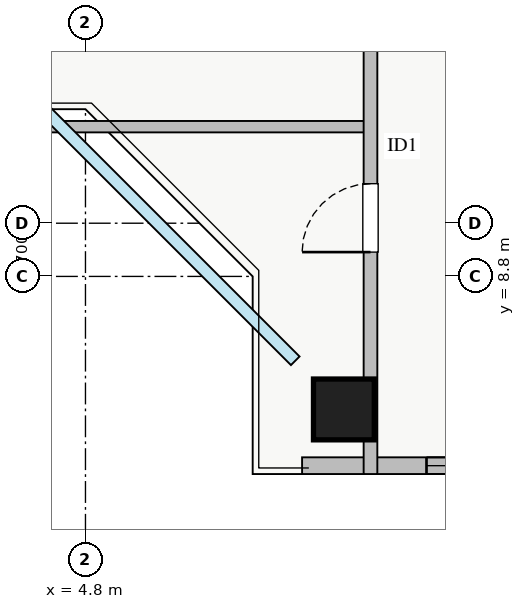
"""IFC4 building model, lengths in metres.
Left out: names, types, materials, properties, quantities, classifications, styles, units other than length and angle.
Written with IfcOpenShell. Run it as: python <this file> out.ifc"""

import sys

from ifc_helpers import new_model, si_unit, direction, frame, frame_2d, origin, origin_2d, place, context, subcontext, project, spatial, rectangle, extrude, source, transform, mapped, element, fill, save


model = new_model("IFC4")
c1 = context("Model", 3, precision=1e-05, world=origin(), true_north=direction((0.0, 1.0)))
c2 = subcontext(c1, "Body", "Model", "MODEL_VIEW")
j1 = project(units=[si_unit("LENGTHUNIT", "METRE"), si_unit("PLANEANGLEUNIT", "RADIAN")], contexts=[c1])
p1 = place(None, origin())
s1 = spatial("IfcSite", under=j1, at=p1, CompositionType="ELEMENT")
p2 = place(p1, origin())
s2 = spatial("IfcBuilding", under=s1, at=p2, CompositionType="ELEMENT")
p3 = place(p2, frame((0.0, 0.0, 203.5)))
s3 = spatial("IfcBuildingStorey", under=s2, at=p3, CompositionType="ELEMENT", Elevation=203.5)
m1 = source(origin(), c2, "Body", "SweptSolid", [
    extrude(rectangle(XDim=0.8, YDim=0.8, at=origin_2d()), origin(), (0.0, 0.0, 1.0), 3.25),
])
p4 = place(p3, frame((8.2, 7.05, 0.0), z_axis=(0.0, 0.0, 1.0), x_axis=(1.0, 0.0, 0.0)))
e1 = element("IfcColumn", 1, at=p4, inside=s3, PredefinedType="COLUMN", context=c2, shape_type="MappedRepresentation", body=[
    mapped(m1, transform((0.0, 0.0, 0.0), x_axis=(1.0, 0.0, 0.0), y_axis=(0.0, 1.0, 0.0), z_axis=(0.0, 0.0, 1.0), scale=1.0)),
])
p5 = place(p3, frame((7.65, 6.31, 0.0), z_axis=(0.0, 0.0, 1.0), x_axis=(1.0, 0.0, 0.0)))
e2 = element("IfcWall", 2, at=p5, inside=s3, PredefinedType="STANDARD", context=c2, shape_type="SweptSolid", body=[
    extrude(rectangle(XDim=22.7, YDim=0.22, at=frame_2d((11.35, 0.0))), origin(), (0.0, 0.0, 1.0), 2.61),
])
p6 = place(p5, frame((12.2, 0.0, 0.0)))
e3 = element("IfcOpeningElement", 3, at=p6, cuts=e2, PredefinedType="OPENING", context=c2, shape_type="SweptSolid", body=[
    extrude(rectangle(XDim=1.2, YDim=2.1, at=frame_2d((0.6, 1.05))), frame((0.0, 0.12, 0.0), z_axis=(0.0, -1.0, 0.0), x_axis=(1.0, 0.0, 0.0)), (0.0, 0.0, 1.0), 0.24),
])
p7 = place(p5, frame((1.637, 0.0, 0.9)))
e4 = element("IfcOpeningElement", 4, at=p7, cuts=e2, PredefinedType="OPENING", context=c2, shape_type="SweptSolid", body=[
    extrude(rectangle(XDim=2.4, YDim=1.48, at=frame_2d((1.2, 0.74))), frame((0.0, 0.12, 0.0), z_axis=(0.0, -1.0, 0.0), x_axis=(1.0, 0.0, 0.0)), (0.0, 0.0, 1.0), 0.24),
])
p8 = place(p5, frame((7.612, 0.0, 0.9)))
e5 = element("IfcOpeningElement", 5, at=p8, cuts=e2, PredefinedType="OPENING", context=c2, shape_type="SweptSolid", body=[
    extrude(rectangle(XDim=1.8, YDim=1.45, at=frame_2d((0.9, 0.725))), frame((0.0, 0.12, 0.0), z_axis=(0.0, -1.0, 0.0), x_axis=(1.0, 0.0, 0.0)), (0.0, 0.0, 1.0), 0.24),
])
p9 = place(p5, frame((20.137, 0.0, 0.9)))
e6 = element("IfcOpeningElement", 6, at=p9, cuts=e2, PredefinedType="OPENING", context=c2, shape_type="SweptSolid", body=[
    extrude(rectangle(XDim=2.1, YDim=1.5, at=frame_2d((1.05, 0.75))), frame((0.0, 0.12, 0.0), z_axis=(0.0, -1.0, 0.0), x_axis=(1.0, 0.0, 0.0)), (0.0, 0.0, 1.0), 0.24),
])
p10 = place(p5, frame((16.72, 0.0, 0.9)))
e7 = element("IfcOpeningElement", 7, at=p10, cuts=e2, PredefinedType="OPENING", context=c2, shape_type="SweptSolid", body=[
    extrude(rectangle(XDim=2.4, YDim=1.5, at=frame_2d((1.2, 0.75))), frame((0.0, 0.12, 0.0), z_axis=(0.0, -1.0, 0.0), x_axis=(1.0, 0.0, 0.0)), (0.0, 0.0, 1.0), 0.24),
])
p11 = place(p3, frame((2.45, 10.77, 0.0), z_axis=(0.0, 0.0, 1.0), x_axis=(1.0, 0.0, 0.0)))
e8 = element("IfcWall", 8, at=p11, inside=s3, PredefinedType="PARTITIONING", context=c2, shape_type="SweptSolid", body=[
    extrude(rectangle(XDim=6.1, YDim=0.15, at=frame_2d((3.05, 0.0))), origin(), (0.0, 0.0, 1.0), 3.07),
])
p12 = place(p3, frame((8.55, 6.2, 0.0), z_axis=(0.0, 0.0, 1.0), x_axis=(0.0, 1.0, 0.0)))
e9 = element("IfcWall", 9, at=p12, inside=s3, PredefinedType="PARTITIONING", context=c2, shape_type="SweptSolid", body=[
    extrude(rectangle(XDim=33.6, YDim=0.18, at=frame_2d((16.8, 0.0))), origin(), (0.0, 0.0, 1.0), 3.07),
])
p13 = place(p12, frame((29.605, 0.0, 0.0)))
e10 = element("IfcOpeningElement", 10, at=p13, cuts=e9, PredefinedType="OPENING", context=c2, shape_type="SweptSolid", body=[
    extrude(rectangle(XDim=0.9, YDim=2.05, at=frame_2d((0.45, 1.025))), frame((0.0, 0.1, 0.0), z_axis=(0.0, -1.0, 0.0), x_axis=(1.0, 0.0, 0.0)), (0.0, 0.0, 1.0), 0.2),
])
p14 = place(p12, frame((2.92, 0.0, 0.0)))
e11 = element("IfcOpeningElement", 11, at=p14, cuts=e9, PredefinedType="OPENING", context=c2, shape_type="SweptSolid", body=[
    extrude(rectangle(XDim=0.9, YDim=2.05, at=frame_2d((0.45, 1.025))), frame((0.0, 0.1, 0.0), z_axis=(0.0, -1.0, 0.0), x_axis=(1.0, 0.0, 0.0)), (0.0, 0.0, 1.0), 0.2),
])
p15 = place(p12, frame((6.48, 0.0, 0.0)))
e12 = element("IfcOpeningElement", 12, at=p15, cuts=e9, PredefinedType="OPENING", context=c2, shape_type="SweptSolid", body=[
    extrude(rectangle(XDim=1.0, YDim=2.05, at=frame_2d((0.5, 1.025))), frame((0.0, 0.1, 0.0), z_axis=(0.0, -1.0, 0.0), x_axis=(1.0, 0.0, 0.0)), (0.0, 0.0, 1.0), 0.2),
])
p16 = place(p12, frame((16.51, 0.0, 0.0)))
e13 = element("IfcOpeningElement", 13, at=p16, cuts=e9, PredefinedType="OPENING", context=c2, shape_type="SweptSolid", body=[
    extrude(rectangle(XDim=1.0, YDim=2.05, at=frame_2d((0.5, 1.025))), frame((0.0, 0.1, 0.0), z_axis=(0.0, -1.0, 0.0), x_axis=(1.0, 0.0, 0.0)), (0.0, 0.0, 1.0), 0.2),
])
p17 = place(p12, frame((22.21, 0.0, 0.0)))
e14 = element("IfcOpeningElement", 14, at=p17, cuts=e9, PredefinedType="OPENING", context=c2, shape_type="SweptSolid", body=[
    extrude(rectangle(XDim=1.0, YDim=2.05, at=frame_2d((0.5, 1.025))), frame((0.0, 0.1, 0.0), z_axis=(0.0, -1.0, 0.0), x_axis=(1.0, 0.0, 0.0)), (0.0, 0.0, 1.0), 0.2),
])
m2 = source(origin(), c2, "Body", "SweptSolid", [
    extrude(rectangle(XDim=2.4, YDim=1.48, at=frame_2d((1.2, 0.74))), frame((0.0, 0.03, 0.0), z_axis=(0.0, -1.0, 0.0), x_axis=(1.0, 0.0, 0.0)), (0.0, 0.0, 1.0), 0.06),
])
p18 = place(p7, origin())
e15 = element("IfcWindow", 15, at=p18, inside=s3, PartitioningType="TRIPLE_PANEL_VERTICAL", PredefinedType="WINDOW", context=c2, shape_type="MappedRepresentation", body=[
    mapped(m2, transform((0.0, 0.0, 0.0), x_axis=(1.0, 0.0, 0.0), y_axis=(0.0, 1.0, 0.0), z_axis=(0.0, 0.0, 1.0), scale=1.0)),
])
fill(e4, e15)
m3 = source(origin(), c2, "Body", "SweptSolid", [
    extrude(rectangle(XDim=0.9, YDim=2.05, at=frame_2d((0.45, 1.025))), frame((0.0, 0.025, 0.0), z_axis=(0.0, -1.0, 0.0), x_axis=(1.0, 0.0, 0.0)), (0.0, 0.0, 1.0), 0.05),
])
p19 = place(p14, origin())
e16 = element("IfcDoor", 16, at=p19, inside=s3, OperationType="SINGLE_SWING_LEFT", PredefinedType="DOOR", context=c2, shape_type="MappedRepresentation", body=[
    mapped(m3, transform((0.0, 0.0, 0.0), x_axis=(1.0, 0.0, 0.0), y_axis=(0.0, 1.0, 0.0), z_axis=(0.0, 0.0, 1.0), scale=1.0)),
])
fill(e11, e16)
save(model, sys.argv[1])
